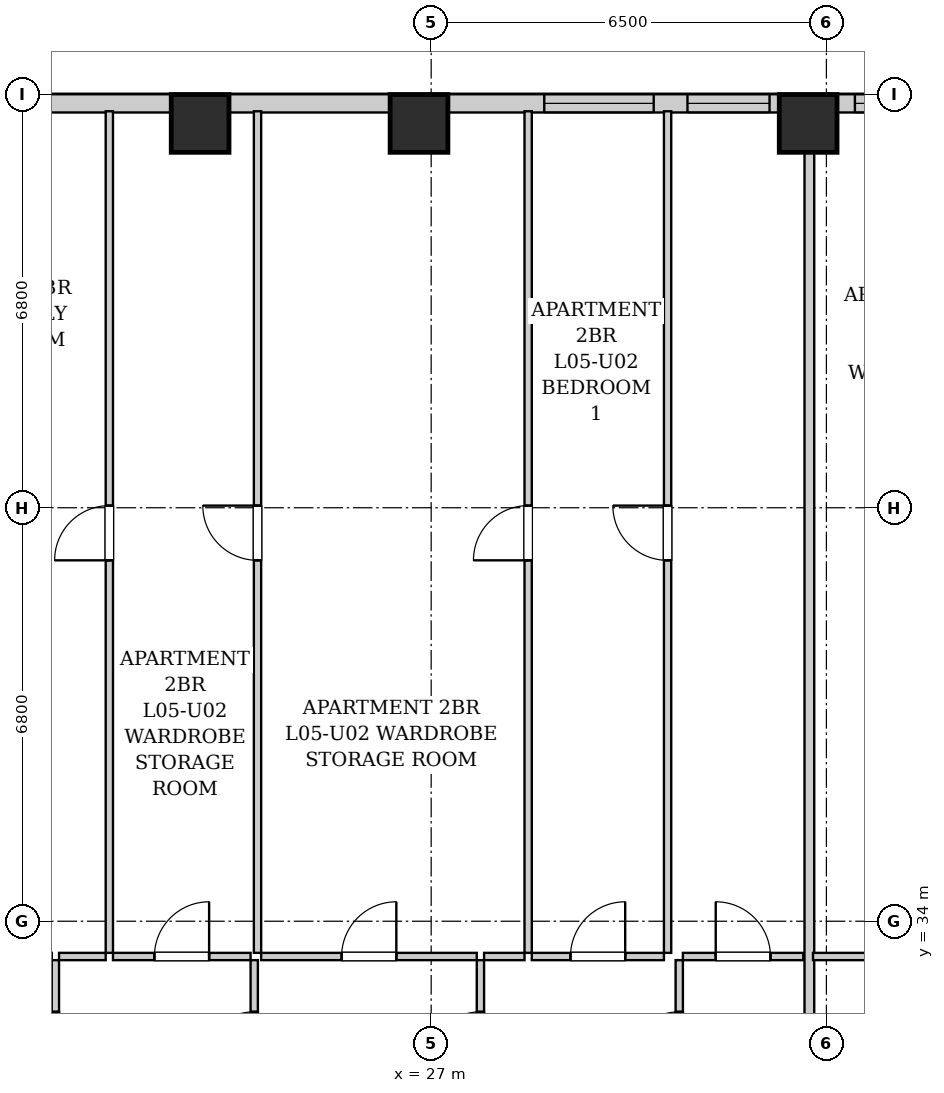
"""IFC4 building model, lengths in metres.
Left out: names, types, materials, properties, quantities, classifications, styles, units other than length and angle.
Written with IfcOpenShell. Run it as: python <this file> out.ifc"""

import sys

from ifc_helpers import new_model, si_unit, direction, frame, frame_2d, origin, origin_2d, place, context, subcontext, project, spatial, rectangle, extrude, element, fill, save


model = new_model("IFC4")
c1 = context("Model", 3, precision=1e-05, world=origin(), true_north=direction((0.0, 1.0)))
c2 = subcontext(c1, "Body", "Model", "MODEL_VIEW")
j1 = project(units=[si_unit("LENGTHUNIT", "METRE"), si_unit("PLANEANGLEUNIT", "RADIAN")], contexts=[c1])
p1 = place(None, origin())
s1 = spatial("IfcSite", under=j1, at=p1, CompositionType="ELEMENT")
p2 = place(p1, origin())
s2 = spatial("IfcBuilding", under=s1, at=p2, CompositionType="ELEMENT")
p3 = place(p2, frame((0.0, 0.0, 25.8)))
s3 = spatial("IfcBuildingStorey", under=s2, at=p3, CompositionType="ELEMENT", Elevation=25.8)
for number, where, z_axis, x_axis in (
    (1, (23.2, 47.12, 0.0), (0.0, 0.0, 1.0), (1.0, 0.0, 0.0)),
    (2, (26.8, 47.12, 0.0), (0.0, 0.0, 1.0), (1.0, 0.0, 0.0)),
    (3, (33.2, 47.12, 0.0), (0.0, 0.0, 1.0), (1.0, 0.0, 0.0)),
):
    element("IfcColumn", number, at=place(p3, frame(where, z_axis=z_axis, x_axis=x_axis)), inside=s3, PredefinedType="COLUMN", context=c2, shape_type="SweptSolid", body=[
        extrude(rectangle(XDim=0.95, YDim=0.95, at=origin_2d()), origin(), (0.0, 0.0, 1.0), 3.2),
    ])
p4 = place(p3, frame((10.0, 47.45, 0.0), z_axis=(0.0, 0.0, 1.0), x_axis=(1.0, 0.0, 0.0)))
e4 = element("IfcWall", 4, at=p4, inside=s3, PredefinedType="SOLIDWALL", context=c2, shape_type="SweptSolid", body=[
    extrude(rectangle(XDim=28.1, YDim=0.3, at=frame_2d((14.05, 0.0))), origin(), (0.0, 0.0, 1.0), 1.975),
])
p5 = place(p4, frame((5.712, 0.0, 0.55)))
e5 = element("IfcOpeningElement", 5, at=p5, cuts=e4, PredefinedType="OPENING", context=c2, shape_type="SweptSolid", body=[
    extrude(rectangle(XDim=1.35, YDim=1.2, at=frame_2d((0.675, 0.6))), frame((0.0, 0.16, 0.0), z_axis=(0.0, -1.0, 0.0), x_axis=(1.0, 0.0, 0.0)), (0.0, 0.0, 1.0), 0.32),
])
p6 = place(p4, frame((8.792, 0.0, 0.55)))
e6 = element("IfcOpeningElement", 6, at=p6, cuts=e4, PredefinedType="OPENING", context=c2, shape_type="SweptSolid", body=[
    extrude(rectangle(XDim=1.8, YDim=1.2, at=frame_2d((0.9, 0.6))), frame((0.0, 0.16, 0.0), z_axis=(0.0, -1.0, 0.0), x_axis=(1.0, 0.0, 0.0)), (0.0, 0.0, 1.0), 0.32),
])
p7 = place(p4, frame((18.86, 0.0, 0.55)))
e7 = element("IfcOpeningElement", 7, at=p7, cuts=e4, PredefinedType="OPENING", context=c2, shape_type="SweptSolid", body=[
    extrude(rectangle(XDim=1.8, YDim=1.2, at=frame_2d((0.9, 0.6))), frame((0.0, 0.16, 0.0), z_axis=(0.0, -1.0, 0.0), x_axis=(1.0, 0.0, 0.0)), (0.0, 0.0, 1.0), 0.32),
])
p8 = place(p4, frame((21.215, 0.0, 0.55)))
e8 = element("IfcOpeningElement", 8, at=p8, cuts=e4, PredefinedType="OPENING", context=c2, shape_type="SweptSolid", body=[
    extrude(rectangle(XDim=1.35, YDim=1.2, at=frame_2d((0.675, 0.6))), frame((0.0, 0.16, 0.0), z_axis=(0.0, -1.0, 0.0), x_axis=(1.0, 0.0, 0.0)), (0.0, 0.0, 1.0), 0.32),
])
p9 = place(p4, frame((23.969, 0.0, 0.55)))
e9 = element("IfcOpeningElement", 9, at=p9, cuts=e4, PredefinedType="OPENING", context=c2, shape_type="SweptSolid", body=[
    extrude(rectangle(XDim=1.8, YDim=1.2, at=frame_2d((0.9, 0.6))), frame((0.0, 0.16, 0.0), z_axis=(0.0, -1.0, 0.0), x_axis=(1.0, 0.0, 0.0)), (0.0, 0.0, 1.0), 0.32),
])
p10 = place(p4, frame((26.698, 0.0, 0.55)))
e10 = element("IfcOpeningElement", 10, at=p10, cuts=e4, PredefinedType="OPENING", context=c2, shape_type="SweptSolid", body=[
    extrude(rectangle(XDim=0.85, YDim=1.2, at=frame_2d((0.425, 0.6))), frame((0.0, 0.16, 0.0), z_axis=(0.0, -1.0, 0.0), x_axis=(1.0, 0.0, 0.0)), (0.0, 0.0, 1.0), 0.32),
])
p11 = place(p3, frame((20.82, 30.76, 0.0), z_axis=(0.0, 0.0, 1.0), x_axis=(0.0, 1.0, 0.0)))
e11 = element("IfcWall", 11, at=p11, inside=s3, PredefinedType="PARTITIONING", context=c2, shape_type="SweptSolid", body=[
    extrude(rectangle(XDim=2.6, YDim=0.12, at=frame_2d((1.3, 0.0))), origin(), (0.0, 0.0, 1.0), 2.94),
])
p12 = place(p11, frame((0.85, 0.0, 0.0)))
e12 = element("IfcOpeningElement", 12, at=p12, cuts=e11, PredefinedType="OPENING", context=c2, shape_type="SweptSolid", body=[
    extrude(rectangle(XDim=0.9, YDim=2.05, at=frame_2d((0.45, 1.025))), frame((0.0, 0.07, 0.0), z_axis=(0.0, -1.0, 0.0), x_axis=(1.0, 0.0, 0.0)), (0.0, 0.0, 1.0), 0.14),
])
p13 = place(p3, frame((24.09, 30.76, 0.0), z_axis=(0.0, 0.0, 1.0), x_axis=(0.0, 1.0, 0.0)))
e13 = element("IfcWall", 13, at=p13, inside=s3, PredefinedType="PARTITIONING", context=c2, shape_type="SweptSolid", body=[
    extrude(rectangle(XDim=2.6, YDim=0.12, at=frame_2d((1.3, 0.0))), origin(), (0.0, 0.0, 1.0), 2.94),
])
p14 = place(p13, frame((0.85, 0.0, 0.0)))
e14 = element("IfcOpeningElement", 14, at=p14, cuts=e13, PredefinedType="OPENING", context=c2, shape_type="SweptSolid", body=[
    extrude(rectangle(XDim=0.9, YDim=2.05, at=frame_2d((0.45, 1.025))), frame((0.0, 0.07, 0.0), z_axis=(0.0, -1.0, 0.0), x_axis=(1.0, 0.0, 0.0)), (0.0, 0.0, 1.0), 0.14),
])
p15 = place(p3, frame((20.88, 33.42, 0.0), z_axis=(0.0, 0.0, 1.0), x_axis=(1.0, 0.0, 0.0)))
e15 = element("IfcWall", 15, at=p15, inside=s3, PredefinedType="PARTITIONING", context=c2, shape_type="SweptSolid", body=[
    extrude(rectangle(XDim=0.767, YDim=0.12, at=frame_2d((0.384, 0.0))), origin(), (0.0, 0.0, 1.0), 2.94),
])
p16 = place(p3, frame((21.767, 33.42, 0.0), z_axis=(0.0, 0.0, 1.0), x_axis=(1.0, 0.0, 0.0)))
e16 = element("IfcWall", 16, at=p16, inside=s3, PredefinedType="PARTITIONING", context=c2, shape_type="SweptSolid", body=[
    extrude(rectangle(XDim=2.263, YDim=0.12, at=frame_2d((1.131, 0.0))), origin(), (0.0, 0.0, 1.0), 2.94),
])
p17 = place(p16, frame((0.681, 0.0, 0.0)))
e17 = element("IfcOpeningElement", 17, at=p17, cuts=e16, PredefinedType="OPENING", context=c2, shape_type="SweptSolid", body=[
    extrude(rectangle(XDim=0.9, YDim=2.05, at=frame_2d((0.45, 1.025))), frame((0.0, 0.07, 0.0), z_axis=(0.0, -1.0, 0.0), x_axis=(1.0, 0.0, 0.0)), (0.0, 0.0, 1.0), 0.14),
])
p18 = place(p3, frame((27.81, 30.76, 0.0), z_axis=(0.0, 0.0, 1.0), x_axis=(0.0, 1.0, 0.0)))
e18 = element("IfcWall", 18, at=p18, inside=s3, PredefinedType="PARTITIONING", context=c2, shape_type="SweptSolid", body=[
    extrude(rectangle(XDim=2.6, YDim=0.12, at=frame_2d((1.3, 0.0))), origin(), (0.0, 0.0, 1.0), 2.94),
])
p19 = place(p18, frame((0.85, 0.0, 0.0)))
e19 = element("IfcOpeningElement", 19, at=p19, cuts=e18, PredefinedType="OPENING", context=c2, shape_type="SweptSolid", body=[
    extrude(rectangle(XDim=0.9, YDim=2.05, at=frame_2d((0.45, 1.025))), frame((0.0, 0.07, 0.0), z_axis=(0.0, -1.0, 0.0), x_axis=(1.0, 0.0, 0.0)), (0.0, 0.0, 1.0), 0.14),
])
p20 = place(p3, frame((24.204, 33.42, 0.0), z_axis=(0.0, 0.0, 1.0), x_axis=(1.0, 0.0, 0.0)))
e20 = element("IfcWall", 20, at=p20, inside=s3, PredefinedType="PARTITIONING", context=c2, shape_type="SweptSolid", body=[
    extrude(rectangle(XDim=3.546, YDim=0.12, at=frame_2d((1.773, 0.0))), origin(), (0.0, 0.0, 1.0), 2.94),
])
p21 = place(p20, frame((1.323, 0.0, 0.0)))
e21 = element("IfcOpeningElement", 21, at=p21, cuts=e20, PredefinedType="OPENING", context=c2, shape_type="SweptSolid", body=[
    extrude(rectangle(XDim=0.9, YDim=2.05, at=frame_2d((0.45, 1.025))), frame((0.0, 0.07, 0.0), z_axis=(0.0, -1.0, 0.0), x_axis=(1.0, 0.0, 0.0)), (0.0, 0.0, 1.0), 0.14),
])
p22 = place(p3, frame((31.08, 30.76, 0.0), z_axis=(0.0, 0.0, 1.0), x_axis=(0.0, 1.0, 0.0)))
e22 = element("IfcWall", 22, at=p22, inside=s3, PredefinedType="PARTITIONING", context=c2, shape_type="SweptSolid", body=[
    extrude(rectangle(XDim=2.6, YDim=0.12, at=frame_2d((1.3, 0.0))), origin(), (0.0, 0.0, 1.0), 2.94),
])
p23 = place(p22, frame((0.85, 0.0, 0.0)))
e23 = element("IfcOpeningElement", 23, at=p23, cuts=e22, PredefinedType="OPENING", context=c2, shape_type="SweptSolid", body=[
    extrude(rectangle(XDim=0.9, YDim=2.05, at=frame_2d((0.45, 1.025))), frame((0.0, 0.07, 0.0), z_axis=(0.0, -1.0, 0.0), x_axis=(1.0, 0.0, 0.0)), (0.0, 0.0, 1.0), 0.14),
])
p24 = place(p3, frame((27.87, 33.42, 0.0), z_axis=(0.0, 0.0, 1.0), x_axis=(1.0, 0.0, 0.0)))
e24 = element("IfcWall", 24, at=p24, inside=s3, PredefinedType="PARTITIONING", context=c2, shape_type="SweptSolid", body=[
    extrude(rectangle(XDim=0.665, YDim=0.12, at=frame_2d((0.333, 0.0))), origin(), (0.0, 0.0, 1.0), 2.94),
])
p25 = place(p3, frame((28.655, 33.42, 0.0), z_axis=(0.0, 0.0, 1.0), x_axis=(1.0, 0.0, 0.0)))
e25 = element("IfcWall", 25, at=p25, inside=s3, PredefinedType="PARTITIONING", context=c2, shape_type="SweptSolid", body=[
    extrude(rectangle(XDim=2.173, YDim=0.12, at=frame_2d((1.086, 0.0))), origin(), (0.0, 0.0, 1.0), 2.94),
])
p26 = place(p25, frame((0.636, 0.0, 0.0)))
e26 = element("IfcOpeningElement", 26, at=p26, cuts=e25, PredefinedType="OPENING", context=c2, shape_type="SweptSolid", body=[
    extrude(rectangle(XDim=0.9, YDim=2.05, at=frame_2d((0.45, 1.025))), frame((0.0, 0.07, 0.0), z_axis=(0.0, -1.0, 0.0), x_axis=(1.0, 0.0, 0.0)), (0.0, 0.0, 1.0), 0.14),
])
p27 = place(p3, frame((31.14, 33.42, 0.0), z_axis=(0.0, 0.0, 1.0), x_axis=(1.0, 0.0, 0.0)))
e27 = element("IfcWall", 27, at=p27, inside=s3, PredefinedType="PARTITIONING", context=c2, shape_type="SweptSolid", body=[
    extrude(rectangle(XDim=1.98, YDim=0.12, at=frame_2d((0.99, 0.0))), origin(), (0.0, 0.0, 1.0), 2.94),
])
p28 = place(p27, frame((0.54, 0.0, 0.0)))
e28 = element("IfcOpeningElement", 28, at=p28, cuts=e27, PredefinedType="OPENING", context=c2, shape_type="SweptSolid", body=[
    extrude(rectangle(XDim=0.9, YDim=2.05, at=frame_2d((0.45, 1.025))), frame((0.0, 0.07, 0.0), z_axis=(0.0, -1.0, 0.0), x_axis=(1.0, 0.0, 0.0)), (0.0, 0.0, 1.0), 0.14),
])
p29 = place(p3, frame((21.707, 33.48, 0.0), z_axis=(0.0, 0.0, 1.0), x_axis=(0.0, 1.0, 0.0)))
e29 = element("IfcWall", 29, at=p29, inside=s3, PredefinedType="PARTITIONING", context=c2, shape_type="SweptSolid", body=[
    extrude(rectangle(XDim=13.84, YDim=0.12, at=frame_2d((6.92, 0.0))), origin(), (0.0, 0.0, 1.0), 2.94),
])
p30 = place(p29, frame((6.455, 0.0, 0.0)))
e30 = element("IfcOpeningElement", 30, at=p30, cuts=e29, PredefinedType="OPENING", context=c2, shape_type="SweptSolid", body=[
    extrude(rectangle(XDim=0.9, YDim=2.05, at=frame_2d((0.45, 1.025))), frame((0.0, 0.07, 0.0), z_axis=(0.0, -1.0, 0.0), x_axis=(1.0, 0.0, 0.0)), (0.0, 0.0, 1.0), 0.14),
])
p31 = place(p3, frame((24.144, 33.48, 0.0), z_axis=(0.0, 0.0, 1.0), x_axis=(0.0, 1.0, 0.0)))
e31 = element("IfcWall", 31, at=p31, inside=s3, PredefinedType="PARTITIONING", context=c2, shape_type="SweptSolid", body=[
    extrude(rectangle(XDim=13.84, YDim=0.12, at=frame_2d((6.92, 0.0))), origin(), (0.0, 0.0, 1.0), 2.94),
])
p32 = place(p31, frame((6.455, 0.0, 0.0)))
e32 = element("IfcOpeningElement", 32, at=p32, cuts=e31, PredefinedType="OPENING", context=c2, shape_type="SweptSolid", body=[
    extrude(rectangle(XDim=0.9, YDim=2.05, at=frame_2d((0.45, 1.025))), frame((0.0, 0.07, 0.0), z_axis=(0.0, -1.0, 0.0), x_axis=(1.0, 0.0, 0.0)), (0.0, 0.0, 1.0), 0.14),
])
p33 = place(p3, frame((28.595, 33.48, 0.0), z_axis=(0.0, 0.0, 1.0), x_axis=(0.0, 1.0, 0.0)))
e33 = element("IfcWall", 33, at=p33, inside=s3, PredefinedType="PARTITIONING", context=c2, shape_type="SweptSolid", body=[
    extrude(rectangle(XDim=13.84, YDim=0.12, at=frame_2d((6.92, 0.0))), origin(), (0.0, 0.0, 1.0), 2.94),
])
p34 = place(p33, frame((6.455, 0.0, 0.0)))
e34 = element("IfcOpeningElement", 34, at=p34, cuts=e33, PredefinedType="OPENING", context=c2, shape_type="SweptSolid", body=[
    extrude(rectangle(XDim=0.9, YDim=2.05, at=frame_2d((0.45, 1.025))), frame((0.0, 0.07, 0.0), z_axis=(0.0, -1.0, 0.0), x_axis=(1.0, 0.0, 0.0)), (0.0, 0.0, 1.0), 0.14),
])
p35 = place(p3, frame((30.888, 33.48, 0.0), z_axis=(0.0, 0.0, 1.0), x_axis=(0.0, 1.0, 0.0)))
e35 = element("IfcWall", 35, at=p35, inside=s3, PredefinedType="PARTITIONING", context=c2, shape_type="SweptSolid", body=[
    extrude(rectangle(XDim=13.84, YDim=0.12, at=frame_2d((6.92, 0.0))), origin(), (0.0, 0.0, 1.0), 2.94),
])
p36 = place(p35, frame((6.455, 0.0, 0.0)))
e36 = element("IfcOpeningElement", 36, at=p36, cuts=e35, PredefinedType="OPENING", context=c2, shape_type="SweptSolid", body=[
    extrude(rectangle(XDim=0.9, YDim=2.05, at=frame_2d((0.45, 1.025))), frame((0.0, 0.07, 0.0), z_axis=(0.0, -1.0, 0.0), x_axis=(1.0, 0.0, 0.0)), (0.0, 0.0, 1.0), 0.14),
])
p37 = place(p3, frame((33.22, 30.76, 0.0), z_axis=(0.0, 0.0, 1.0), x_axis=(0.0, 1.0, 0.0)))
e37 = element("IfcWall", 37, at=p37, inside=s3, PredefinedType="PARTITIONING", context=c2, shape_type="SweptSolid", body=[
    extrude(rectangle(XDim=16.56, YDim=0.16, at=frame_2d((8.28, 0.0))), origin(), (0.0, 0.0, 1.0), 2.155),
])
p38 = place(p3, frame((33.28, 33.42, 0.0), z_axis=(0.0, 0.0, 1.0), x_axis=(1.0, 0.0, 0.0)))
e38 = element("IfcWall", 38, at=p38, inside=s3, PredefinedType="PARTITIONING", context=c2, shape_type="SweptSolid", body=[
    extrude(rectangle(XDim=2.4, YDim=0.12, at=frame_2d((1.2, 0.0))), origin(), (0.0, 0.0, 1.0), 2.94),
])
p39 = place(p12, origin())
e39 = element("IfcDoor", 39, at=p39, inside=s3, OperationType="SINGLE_SWING_LEFT", PredefinedType="DOOR", context=c2, shape_type="SweptSolid", body=[
    extrude(rectangle(XDim=0.9, YDim=2.05, at=frame_2d((0.45, 1.025))), frame((0.0, 0.025, 0.0), z_axis=(0.0, -1.0, 0.0), x_axis=(1.0, 0.0, 0.0)), (0.0, 0.0, 1.0), 0.05),
])
fill(e12, e39)
p40 = place(p14, origin())
e40 = element("IfcDoor", 40, at=p40, inside=s3, OperationType="SINGLE_SWING_LEFT", PredefinedType="DOOR", context=c2, shape_type="SweptSolid", body=[
    extrude(rectangle(XDim=0.9, YDim=2.05, at=frame_2d((0.45, 1.025))), frame((0.0, 0.025, 0.0), z_axis=(0.0, -1.0, 0.0), x_axis=(1.0, 0.0, 0.0)), (0.0, 0.0, 1.0), 0.05),
])
fill(e14, e40)
p41 = place(p17, origin())
e41 = element("IfcDoor", 41, at=p41, inside=s3, OperationType="SINGLE_SWING_RIGHT", PredefinedType="DOOR", context=c2, shape_type="SweptSolid", body=[
    extrude(rectangle(XDim=0.9, YDim=2.05, at=frame_2d((0.45, 1.025))), frame((0.0, 0.025, 0.0), z_axis=(0.0, -1.0, 0.0), x_axis=(1.0, 0.0, 0.0)), (0.0, 0.0, 1.0), 0.05),
])
fill(e17, e41)
p42 = place(p19, origin())
e42 = element("IfcDoor", 42, at=p42, inside=s3, OperationType="SINGLE_SWING_LEFT", PredefinedType="DOOR", context=c2, shape_type="SweptSolid", body=[
    extrude(rectangle(XDim=0.9, YDim=2.05, at=frame_2d((0.45, 1.025))), frame((0.0, 0.025, 0.0), z_axis=(0.0, -1.0, 0.0), x_axis=(1.0, 0.0, 0.0)), (0.0, 0.0, 1.0), 0.05),
])
fill(e19, e42)
p43 = place(p21, origin())
e43 = element("IfcDoor", 43, at=p43, inside=s3, OperationType="SINGLE_SWING_RIGHT", PredefinedType="DOOR", context=c2, shape_type="SweptSolid", body=[
    extrude(rectangle(XDim=0.9, YDim=2.05, at=frame_2d((0.45, 1.025))), frame((0.0, 0.025, 0.0), z_axis=(0.0, -1.0, 0.0), x_axis=(1.0, 0.0, 0.0)), (0.0, 0.0, 1.0), 0.05),
])
fill(e21, e43)
p44 = place(p23, origin())
e44 = element("IfcDoor", 44, at=p44, inside=s3, OperationType="SINGLE_SWING_LEFT", PredefinedType="DOOR", context=c2, shape_type="SweptSolid", body=[
    extrude(rectangle(XDim=0.9, YDim=2.05, at=frame_2d((0.45, 1.025))), frame((0.0, 0.025, 0.0), z_axis=(0.0, -1.0, 0.0), x_axis=(1.0, 0.0, 0.0)), (0.0, 0.0, 1.0), 0.05),
])
fill(e23, e44)
p45 = place(p26, origin())
e45 = element("IfcDoor", 45, at=p45, inside=s3, OperationType="SINGLE_SWING_RIGHT", PredefinedType="DOOR", context=c2, shape_type="SweptSolid", body=[
    extrude(rectangle(XDim=0.9, YDim=2.05, at=frame_2d((0.45, 1.025))), frame((0.0, 0.025, 0.0), z_axis=(0.0, -1.0, 0.0), x_axis=(1.0, 0.0, 0.0)), (0.0, 0.0, 1.0), 0.05),
])
fill(e26, e45)
p46 = place(p28, origin())
e46 = element("IfcDoor", 46, at=p46, inside=s3, OperationType="SINGLE_SWING_LEFT", PredefinedType="DOOR", context=c2, shape_type="SweptSolid", body=[
    extrude(rectangle(XDim=0.9, YDim=2.05, at=frame_2d((0.45, 1.025))), frame((0.0, 0.025, 0.0), z_axis=(0.0, -1.0, 0.0), x_axis=(1.0, 0.0, 0.0)), (0.0, 0.0, 1.0), 0.05),
])
fill(e28, e46)
p47 = place(p30, origin())
e47 = element("IfcDoor", 47, at=p47, inside=s3, OperationType="SINGLE_SWING_LEFT", PredefinedType="DOOR", context=c2, shape_type="SweptSolid", body=[
    extrude(rectangle(XDim=0.9, YDim=2.05, at=frame_2d((0.45, 1.025))), frame((0.0, 0.025, 0.0), z_axis=(0.0, -1.0, 0.0), x_axis=(1.0, 0.0, 0.0)), (0.0, 0.0, 1.0), 0.05),
])
fill(e30, e47)
p48 = place(p32, origin())
e48 = element("IfcDoor", 48, at=p48, inside=s3, OperationType="SINGLE_SWING_RIGHT", PredefinedType="DOOR", context=c2, shape_type="SweptSolid", body=[
    extrude(rectangle(XDim=0.9, YDim=2.05, at=frame_2d((0.45, 1.025))), frame((0.0, 0.025, 0.0), z_axis=(0.0, -1.0, 0.0), x_axis=(1.0, 0.0, 0.0)), (0.0, 0.0, 1.0), 0.05),
])
fill(e32, e48)
p49 = place(p34, origin())
e49 = element("IfcDoor", 49, at=p49, inside=s3, OperationType="SINGLE_SWING_LEFT", PredefinedType="DOOR", context=c2, shape_type="SweptSolid", body=[
    extrude(rectangle(XDim=0.9, YDim=2.05, at=frame_2d((0.45, 1.025))), frame((0.0, 0.025, 0.0), z_axis=(0.0, -1.0, 0.0), x_axis=(1.0, 0.0, 0.0)), (0.0, 0.0, 1.0), 0.05),
])
fill(e34, e49)
p50 = place(p36, origin())
e50 = element("IfcDoor", 50, at=p50, inside=s3, OperationType="SINGLE_SWING_RIGHT", PredefinedType="DOOR", context=c2, shape_type="SweptSolid", body=[
    extrude(rectangle(XDim=0.9, YDim=2.05, at=frame_2d((0.45, 1.025))), frame((0.0, 0.025, 0.0), z_axis=(0.0, -1.0, 0.0), x_axis=(1.0, 0.0, 0.0)), (0.0, 0.0, 1.0), 0.05),
])
fill(e36, e50)
p51 = place(p7, origin())
e51 = element("IfcWindow", 51, at=p51, inside=s3, PartitioningType="DOUBLE_PANEL_VERTICAL", PredefinedType="WINDOW", context=c2, shape_type="SweptSolid", body=[
    extrude(rectangle(XDim=1.8, YDim=1.2, at=frame_2d((0.9, 0.6))), frame((0.0, 0.03, 0.0), z_axis=(0.0, -1.0, 0.0), x_axis=(1.0, 0.0, 0.0)), (0.0, 0.0, 1.0), 0.06),
])
fill(e7, e51)
p52 = place(p8, origin())
e52 = element("IfcWindow", 52, at=p52, inside=s3, PartitioningType="SINGLE_PANEL", PredefinedType="WINDOW", context=c2, shape_type="SweptSolid", body=[
    extrude(rectangle(XDim=1.35, YDim=1.2, at=frame_2d((0.675, 0.6))), frame((0.0, 0.03, 0.0), z_axis=(0.0, -1.0, 0.0), x_axis=(1.0, 0.0, 0.0)), (0.0, 0.0, 1.0), 0.06),
])
fill(e8, e52)
p53 = place(p9, origin())
e53 = element("IfcWindow", 53, at=p53, inside=s3, PartitioningType="DOUBLE_PANEL_VERTICAL", PredefinedType="WINDOW", context=c2, shape_type="SweptSolid", body=[
    extrude(rectangle(XDim=1.8, YDim=1.2, at=frame_2d((0.9, 0.6))), frame((0.0, 0.03, 0.0), z_axis=(0.0, -1.0, 0.0), x_axis=(1.0, 0.0, 0.0)), (0.0, 0.0, 1.0), 0.06),
])
fill(e9, e53)
save(model, sys.argv[1])
